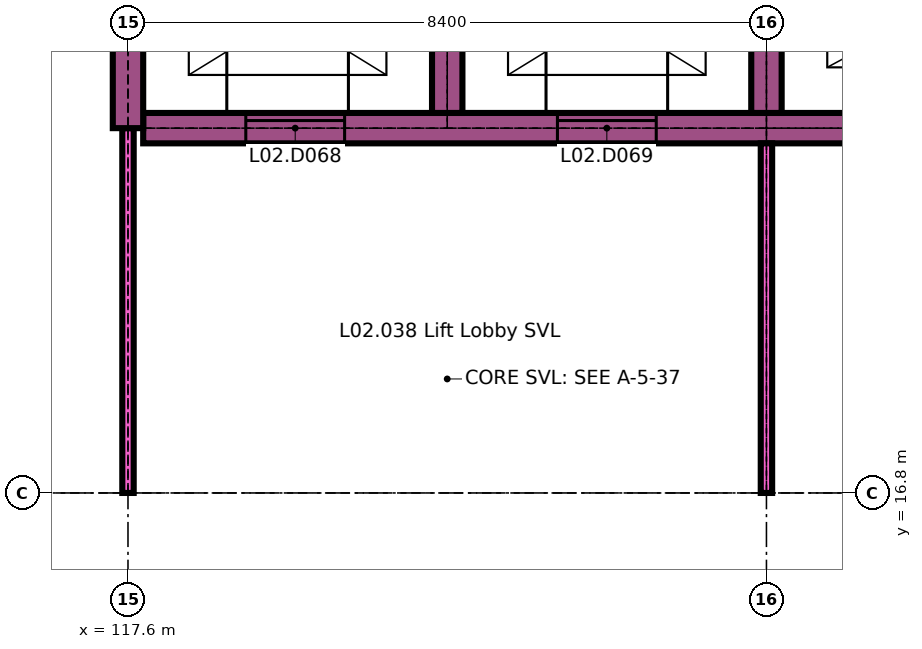
"""IFC4 building model, lengths in metres.
Left out: names, types, materials, properties, quantities, classifications, styles, units other than length and angle.
Written with IfcOpenShell. Run it as: python <this file> out.ifc"""

import sys

from ifc_helpers import new_model, si_unit, direction, frame, frame_2d, origin, place, context, subcontext, project, spatial, rectangle, extrude, element, fill, save


model = new_model("IFC4")
c1 = context("Model", 3, precision=1e-05, world=origin(), true_north=direction((0.0, 1.0)))
c2 = subcontext(c1, "Body", "Model", "MODEL_VIEW")
j1 = project(units=[si_unit("LENGTHUNIT", "METRE"), si_unit("PLANEANGLEUNIT", "RADIAN")], contexts=[c1])
p1 = place(None, origin())
s1 = spatial("IfcSite", under=j1, at=p1, CompositionType="ELEMENT")
p2 = place(p1, origin())
s2 = spatial("IfcBuilding", under=s1, at=p2, CompositionType="ELEMENT")
p3 = place(p2, frame((0.0, 0.0, 8.4)))
s3 = spatial("IfcBuildingStorey", under=s2, at=p3, CompositionType="ELEMENT", Elevation=8.4)
p4 = place(p3, frame((117.8, 21.6, 0.0), z_axis=(0.0, 0.0, 1.0), x_axis=(1.0, 0.0, 0.0)))
e1 = element("IfcWall", 1, at=p4, inside=s3, PredefinedType="SHEAR", context=c2, shape_type="SweptSolid", body=[
    extrude(rectangle(XDim=24.8, YDim=0.4, at=frame_2d((12.4, 0.0))), origin(), (0.0, 0.0, 1.0), 4.2),
])
p5 = place(p4, frame((1.35, 0.0, 0.0)))
e2 = element("IfcOpeningElement", 2, at=p5, cuts=e1, PredefinedType="OPENING", context=c2, shape_type="SweptSolid", body=[
    extrude(rectangle(XDim=1.3, YDim=2.1, at=frame_2d((0.65, 1.05))), frame((0.0, 0.21, 0.0), z_axis=(0.0, -1.0, 0.0), x_axis=(1.0, 0.0, 0.0)), (0.0, 0.0, 1.0), 0.42),
])
p6 = place(p4, frame((5.45, 0.0, 0.0)))
e3 = element("IfcOpeningElement", 3, at=p6, cuts=e1, PredefinedType="OPENING", context=c2, shape_type="SweptSolid", body=[
    extrude(rectangle(XDim=1.3, YDim=2.1, at=frame_2d((0.65, 1.05))), frame((0.0, 0.21, 0.0), z_axis=(0.0, -1.0, 0.0), x_axis=(1.0, 0.0, 0.0)), (0.0, 0.0, 1.0), 0.42),
])
p7 = place(p4, frame((9.65, 0.0, 0.0)))
e4 = element("IfcOpeningElement", 4, at=p7, cuts=e1, PredefinedType="OPENING", context=c2, shape_type="SweptSolid", body=[
    extrude(rectangle(XDim=1.3, YDim=2.1, at=frame_2d((0.65, 1.05))), frame((0.0, 0.21, 0.0), z_axis=(0.0, -1.0, 0.0), x_axis=(1.0, 0.0, 0.0)), (0.0, 0.0, 1.0), 0.42),
])
p8 = place(p4, frame((13.85, 0.0, 0.0)))
e5 = element("IfcOpeningElement", 5, at=p8, cuts=e1, PredefinedType="OPENING", context=c2, shape_type="SweptSolid", body=[
    extrude(rectangle(XDim=1.3, YDim=2.1, at=frame_2d((0.65, 1.05))), frame((0.0, 0.21, 0.0), z_axis=(0.0, -1.0, 0.0), x_axis=(1.0, 0.0, 0.0)), (0.0, 0.0, 1.0), 0.42),
])
p9 = place(p4, frame((18.15, 0.0, 0.0)))
e6 = element("IfcOpeningElement", 6, at=p9, cuts=e1, PredefinedType="OPENING", context=c2, shape_type="SweptSolid", body=[
    extrude(rectangle(XDim=1.1, YDim=2.1, at=frame_2d((0.55, 1.05))), frame((0.0, 0.21, 0.0), z_axis=(0.0, -1.0, 0.0), x_axis=(1.0, 0.0, 0.0)), (0.0, 0.0, 1.0), 0.42),
])
p10 = place(p4, frame((22.25, 0.0, 0.0)))
e7 = element("IfcOpeningElement", 7, at=p10, cuts=e1, PredefinedType="OPENING", context=c2, shape_type="SweptSolid", body=[
    extrude(rectangle(XDim=1.1, YDim=2.1, at=frame_2d((0.55, 1.05))), frame((0.0, 0.21, 0.0), z_axis=(0.0, -1.0, 0.0), x_axis=(1.0, 0.0, 0.0)), (0.0, 0.0, 1.0), 0.42),
])
p11 = place(p3, frame((117.6, 16.8, 0.0), z_axis=(0.0, 0.0, 1.0), x_axis=(0.0, 1.0, 0.0)))
e8 = element("IfcWall", 8, at=p11, inside=s3, PredefinedType="PARTITIONING", context=c2, shape_type="SweptSolid", body=[
    extrude(rectangle(XDim=4.8, YDim=0.15, at=frame_2d((2.4, 0.0))), origin(), (0.0, 0.0, 1.0), 4.2),
])
p12 = place(p3, frame((117.6, 21.6, 0.0), z_axis=(0.0, 0.0, 1.0), x_axis=(0.0, 1.0, 0.0)))
e9 = element("IfcWall", 9, at=p12, inside=s3, PredefinedType="SHEAR", context=c2, shape_type="SweptSolid", body=[
    extrude(rectangle(XDim=3.4, YDim=0.4, at=frame_2d((1.7, 0.0))), origin(), (0.0, 0.0, 1.0), 4.2),
])
p13 = place(p3, frame((121.8, 21.8, 0.0), z_axis=(0.0, 0.0, 1.0), x_axis=(0.0, 1.0, 0.0)))
e10 = element("IfcWall", 10, at=p13, inside=s3, PredefinedType="SHEAR", context=c2, shape_type="SweptSolid", body=[
    extrude(rectangle(XDim=3.2, YDim=0.4, at=frame_2d((1.6, 0.0))), origin(), (0.0, 0.0, 1.0), 4.2),
])
p14 = place(p3, frame((126.0, 16.8, 0.0), z_axis=(0.0, 0.0, 1.0), x_axis=(0.0, 1.0, 0.0)))
e11 = element("IfcWall", 11, at=p14, inside=s3, PredefinedType="PARTITIONING", context=c2, shape_type="SweptSolid", body=[
    extrude(rectangle(XDim=4.6, YDim=0.15, at=frame_2d((2.3, 0.0))), origin(), (0.0, 0.0, 1.0), 4.2),
])
p15 = place(p3, frame((126.0, 21.8, 0.0), z_axis=(0.0, 0.0, 1.0), x_axis=(0.0, 1.0, 0.0)))
e12 = element("IfcWall", 12, at=p15, inside=s3, PredefinedType="SHEAR", context=c2, shape_type="SweptSolid", body=[
    extrude(rectangle(XDim=3.2, YDim=0.4, at=frame_2d((1.6, 0.0))), origin(), (0.0, 0.0, 1.0), 4.2),
])
p16 = place(p5, origin())
e13 = element("IfcDoor", 13, at=p16, inside=s3, OperationType="SLIDING_TO_LEFT", PredefinedType="DOOR", context=c2, shape_type="SweptSolid", body=[
    extrude(rectangle(XDim=1.3, YDim=2.1, at=frame_2d((0.65, 1.05))), frame((0.0, 0.025, 0.0), z_axis=(0.0, -1.0, 0.0), x_axis=(1.0, 0.0, 0.0)), (0.0, 0.0, 1.0), 0.05),
])
fill(e2, e13)
p17 = place(p6, origin())
e14 = element("IfcDoor", 14, at=p17, inside=s3, OperationType="SLIDING_TO_LEFT", PredefinedType="DOOR", context=c2, shape_type="SweptSolid", body=[
    extrude(rectangle(XDim=1.3, YDim=2.1, at=frame_2d((0.65, 1.05))), frame((0.0, 0.025, 0.0), z_axis=(0.0, -1.0, 0.0), x_axis=(1.0, 0.0, 0.0)), (0.0, 0.0, 1.0), 0.05),
])
fill(e3, e14)
save(model, sys.argv[1])
